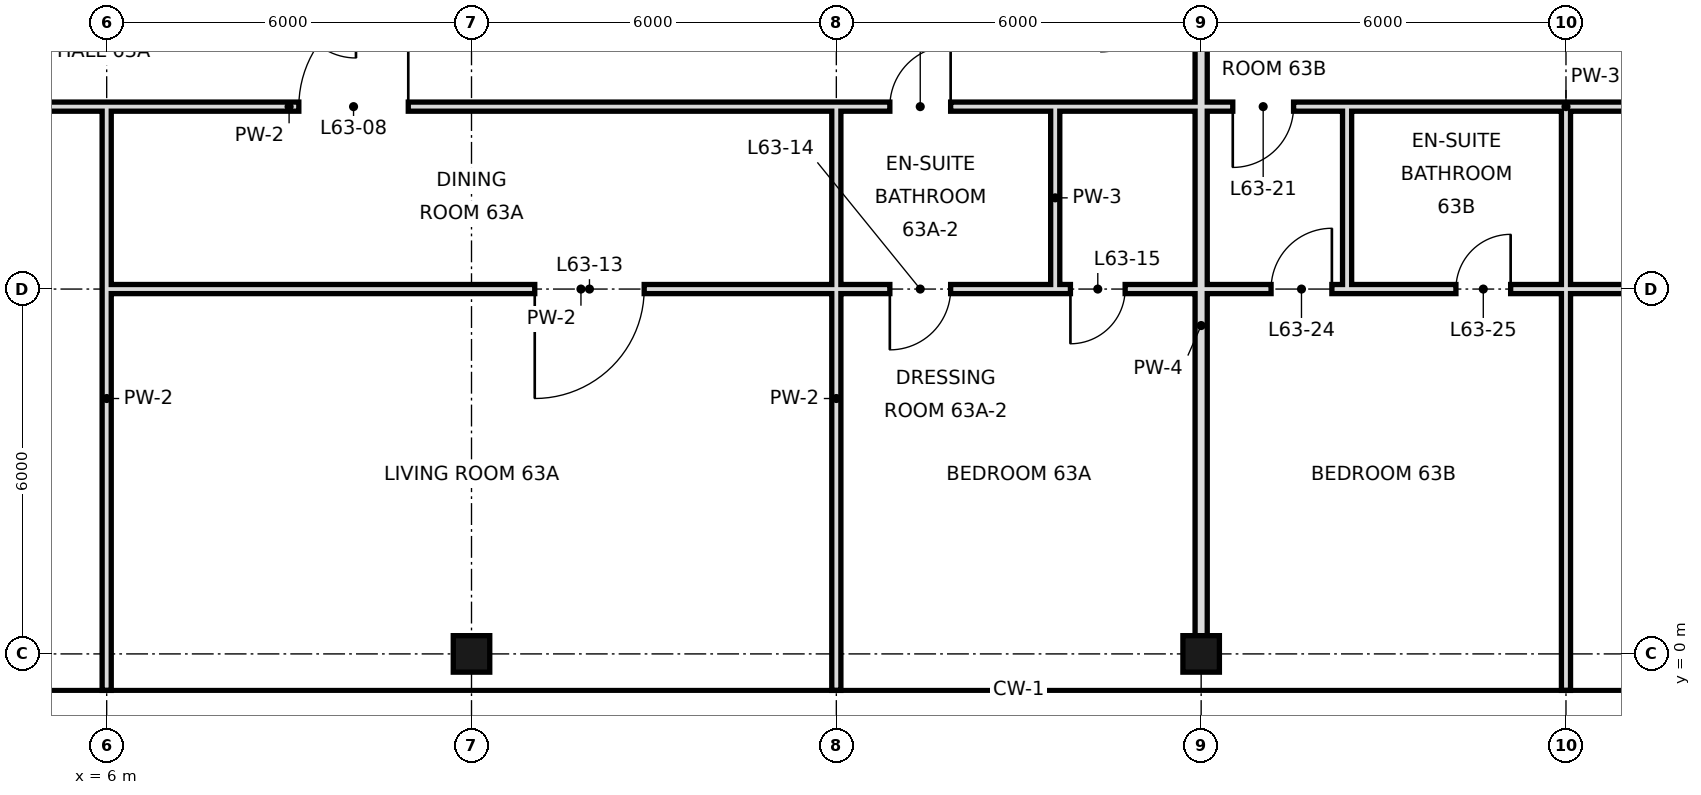
"""IFC4 building model, lengths in metres.
Left out: names, types, materials, properties, quantities, classifications, styles, units other than length and angle.
Written with IfcOpenShell. Run it as: python <this file> out.ifc"""

import sys

from ifc_helpers import new_model, si_unit, direction, frame, frame_2d, origin, origin_2d, place, context, subcontext, project, spatial, rectangle, hollow_rectangle, extrude, element, fill, save


model = new_model("IFC4")
c1 = context("Model", 3, precision=1e-05, world=origin(), true_north=direction((0.0, 1.0)))
c2 = subcontext(c1, "Body", "Model", "MODEL_VIEW")
j1 = project(units=[si_unit("LENGTHUNIT", "METRE"), si_unit("PLANEANGLEUNIT", "RADIAN")], contexts=[c1])
p1 = place(None, origin())
s1 = spatial("IfcSite", under=j1, at=p1, CompositionType="ELEMENT")
p2 = place(p1, origin())
s2 = spatial("IfcBuilding", under=s1, at=p2, CompositionType="ELEMENT")
p3 = place(p2, frame((0.0, 0.0, 266.6)))
s3 = spatial("IfcBuildingStorey", under=s2, at=p3, CompositionType="ELEMENT", Elevation=266.6)
for number, where, z_axis, x_axis in (
    (1, (12.0, 0.0, 0.0), (0.0, 0.0, 1.0), (1.0, 0.0, 0.0)),
    (2, (24.0, 0.0, 0.0), (0.0, 0.0, 1.0), (1.0, 0.0, 0.0)),
):
    element("IfcColumn", number, at=place(p3, frame(where, z_axis=z_axis, x_axis=x_axis)), inside=s3, PredefinedType="COLUMN", context=c2, shape_type="SweptSolid", body=[
        extrude(hollow_rectangle(XDim=0.6, YDim=0.6, WallThickness=0.028, at=origin_2d()), origin(), (0.0, 0.0, 1.0), 3.6),
    ])
p4 = place(p3, frame((18.0, -0.6, 0.0), z_axis=(0.0, 0.0, 1.0), x_axis=(0.0, 1.0, 0.0)))
e3 = element("IfcWall", 3, at=p4, inside=s3, PredefinedType="PARTITIONING", context=c2, shape_type="SweptSolid", body=[
    extrude(rectangle(XDim=9.6, YDim=0.15, at=frame_2d((4.8, 0.0))), origin(), (0.0, 0.0, 1.0), 2.72),
])
p5 = place(p3, frame((21.6, 6.0, 0.0), z_axis=(0.0, 0.0, 1.0), x_axis=(0.0, 1.0, 0.0)))
e4 = element("IfcWall", 4, at=p5, inside=s3, PredefinedType="PARTITIONING", context=c2, shape_type="SweptSolid", body=[
    extrude(rectangle(XDim=3.0, YDim=0.15, at=frame_2d((1.5, 0.0))), origin(), (0.0, 0.0, 1.0), 3.42),
])
p6 = place(p3, frame((24.0, 0.0, 0.0), z_axis=(0.0, 0.0, 1.0), x_axis=(0.0, 1.0, 0.0)))
e5 = element("IfcWall", 5, at=p6, inside=s3, PredefinedType="SOLIDWALL", context=c2, shape_type="SweptSolid", body=[
    extrude(rectangle(XDim=10.8, YDim=0.2, at=frame_2d((5.4, 0.0))), origin(), (0.0, 0.0, 1.0), 2.72),
])
p7 = place(p3, frame((26.4, 6.0, 0.0), z_axis=(0.0, 0.0, 1.0), x_axis=(0.0, 1.0, 0.0)))
e6 = element("IfcWall", 6, at=p7, inside=s3, PredefinedType="PARTITIONING", context=c2, shape_type="SweptSolid", body=[
    extrude(rectangle(XDim=3.0, YDim=0.15, at=frame_2d((1.5, 0.0))), origin(), (0.0, 0.0, 1.0), 3.42),
])
p8 = place(p3, frame((30.0, -0.6, 0.0), z_axis=(0.0, 0.0, 1.0), x_axis=(0.0, 1.0, 0.0)))
e7 = element("IfcWall", 7, at=p8, inside=s3, PredefinedType="PARTITIONING", context=c2, shape_type="SweptSolid", body=[
    extrude(rectangle(XDim=6.6, YDim=0.15, at=frame_2d((3.3, 0.0))), origin(), (0.0, 0.0, 1.0), 2.72),
])
p9 = place(p3, frame((30.0, 6.0, 0.0), z_axis=(0.0, 0.0, 1.0), x_axis=(0.0, 1.0, 0.0)))
e8 = element("IfcWall", 8, at=p9, inside=s3, PredefinedType="PARTITIONING", context=c2, shape_type="SweptSolid", body=[
    extrude(rectangle(XDim=3.0, YDim=0.15, at=frame_2d((1.5, 0.0))), origin(), (0.0, 0.0, 1.0), 2.72),
])
p10 = place(p3, frame((6.0, -0.6, 0.0), z_axis=(0.0, 0.0, 1.0), x_axis=(0.0, 1.0, 0.0)))
e9 = element("IfcWall", 9, at=p10, inside=s3, PredefinedType="PARTITIONING", context=c2, shape_type="SweptSolid", body=[
    extrude(rectangle(XDim=9.6, YDim=0.15, at=frame_2d((4.8, 0.0))), origin(), (0.0, 0.0, 1.0), 2.72),
])
p11 = place(p3, frame((6.0, 6.0, 0.0), z_axis=(0.0, 0.0, 1.0), x_axis=(1.0, 0.0, 0.0)))
e10 = element("IfcWall", 10, at=p11, inside=s3, PredefinedType="PARTITIONING", context=c2, shape_type="SweptSolid", body=[
    extrude(rectangle(XDim=15.6, YDim=0.15, at=frame_2d((7.8, 0.0))), origin(), (0.0, 0.0, 1.0), 2.97),
])
p12 = place(p11, frame((7.04, 0.0, 0.0)))
e11 = element("IfcOpeningElement", 11, at=p12, cuts=e10, PredefinedType="OPENING", context=c2, shape_type="SweptSolid", body=[
    extrude(rectangle(XDim=1.8, YDim=2.4, at=frame_2d((0.9, 1.2))), frame((0.0, 0.085, 0.0), z_axis=(0.0, -1.0, 0.0), x_axis=(1.0, 0.0, 0.0)), (0.0, 0.0, 1.0), 0.17),
])
p13 = place(p11, frame((12.88, 0.0, 0.0)))
e12 = element("IfcOpeningElement", 12, at=p13, cuts=e10, PredefinedType="OPENING", context=c2, shape_type="SweptSolid", body=[
    extrude(rectangle(XDim=1.0, YDim=2.4, at=frame_2d((0.5, 1.2))), frame((0.0, 0.085, 0.0), z_axis=(0.0, -1.0, 0.0), x_axis=(1.0, 0.0, 0.0)), (0.0, 0.0, 1.0), 0.17),
])
p14 = place(p3, frame((24.0, 6.0, 0.0), z_axis=(0.0, 0.0, 1.0), x_axis=(1.0, 0.0, 0.0)))
e13 = element("IfcWall", 13, at=p14, inside=s3, PredefinedType="PARTITIONING", context=c2, shape_type="SweptSolid", body=[
    extrude(rectangle(XDim=2.4, YDim=0.15, at=frame_2d((1.2, 0.0))), origin(), (0.0, 0.0, 1.0), 2.97),
])
p15 = place(p14, frame((1.15, 0.0, 0.0)))
e14 = element("IfcOpeningElement", 14, at=p15, cuts=e13, PredefinedType="OPENING", context=c2, shape_type="SweptSolid", body=[
    extrude(rectangle(XDim=1.0, YDim=2.4, at=frame_2d((0.5, 1.2))), frame((0.0, 0.085, 0.0), z_axis=(0.0, -1.0, 0.0), x_axis=(1.0, 0.0, 0.0)), (0.0, 0.0, 1.0), 0.17),
])
p16 = place(p3, frame((30.0, 6.0, 0.0), z_axis=(0.0, 0.0, 1.0), x_axis=(1.0, 0.0, 0.0)))
e15 = element("IfcWall", 15, at=p16, inside=s3, PredefinedType="PARTITIONING", context=c2, shape_type="SweptSolid", body=[
    extrude(rectangle(XDim=15.6, YDim=0.15, at=frame_2d((7.8, 0.0))), origin(), (0.0, 0.0, 1.0), 2.97),
])
p17 = place(p16, frame((3.16, 0.0, 0.0)))
e16 = element("IfcOpeningElement", 16, at=p17, cuts=e15, PredefinedType="OPENING", context=c2, shape_type="SweptSolid", body=[
    extrude(rectangle(XDim=1.8, YDim=2.4, at=frame_2d((0.9, 1.2))), frame((0.0, 0.085, 0.0), z_axis=(0.0, -1.0, 0.0), x_axis=(1.0, 0.0, 0.0)), (0.0, 0.0, 1.0), 0.17),
])
p18 = place(p16, frame((12.88, 0.0, 0.0)))
e17 = element("IfcOpeningElement", 17, at=p18, cuts=e15, PredefinedType="OPENING", context=c2, shape_type="SweptSolid", body=[
    extrude(rectangle(XDim=1.0, YDim=2.4, at=frame_2d((0.5, 1.2))), frame((0.0, 0.085, 0.0), z_axis=(0.0, -1.0, 0.0), x_axis=(1.0, 0.0, 0.0)), (0.0, 0.0, 1.0), 0.17),
])
p19 = place(p3, frame((21.6, 6.0, 0.0), z_axis=(0.0, 0.0, 1.0), x_axis=(1.0, 0.0, 0.0)))
e18 = element("IfcWall", 18, at=p19, inside=s3, PredefinedType="PARTITIONING", context=c2, shape_type="SweptSolid", body=[
    extrude(rectangle(XDim=2.4, YDim=0.15, at=frame_2d((1.2, 0.0))), origin(), (0.0, 0.0, 1.0), 2.97),
])
p20 = place(p19, frame((0.25, 0.0, 0.0)))
e19 = element("IfcOpeningElement", 19, at=p20, cuts=e18, PredefinedType="OPENING", context=c2, shape_type="SweptSolid", body=[
    extrude(rectangle(XDim=0.9, YDim=2.4, at=frame_2d((0.45, 1.2))), frame((0.0, 0.085, 0.0), z_axis=(0.0, -1.0, 0.0), x_axis=(1.0, 0.0, 0.0)), (0.0, 0.0, 1.0), 0.17),
])
p21 = place(p3, frame((26.4, 6.0, 0.0), z_axis=(0.0, 0.0, 1.0), x_axis=(1.0, 0.0, 0.0)))
e20 = element("IfcWall", 20, at=p21, inside=s3, PredefinedType="PARTITIONING", context=c2, shape_type="SweptSolid", body=[
    extrude(rectangle(XDim=3.6, YDim=0.15, at=frame_2d((1.8, 0.0))), origin(), (0.0, 0.0, 1.0), 2.97),
])
p22 = place(p21, frame((1.79, 0.0, 0.0)))
e21 = element("IfcOpeningElement", 21, at=p22, cuts=e20, PredefinedType="OPENING", context=c2, shape_type="SweptSolid", body=[
    extrude(rectangle(XDim=0.9, YDim=2.4, at=frame_2d((0.45, 1.2))), frame((0.0, 0.085, 0.0), z_axis=(0.0, -1.0, 0.0), x_axis=(1.0, 0.0, 0.0)), (0.0, 0.0, 1.0), 0.17),
])
p23 = place(p3, frame((-3.6, 9.0, 0.0), z_axis=(0.0, 0.0, 1.0), x_axis=(1.0, 0.0, 0.0)))
e22 = element("IfcWall", 22, at=p23, inside=s3, PredefinedType="PARTITIONING", context=c2, shape_type="SweptSolid", body=[
    extrude(rectangle(XDim=25.2, YDim=0.15, at=frame_2d((12.6, 0.0))), origin(), (0.0, 0.0, 1.0), 3.42),
])
p24 = place(p23, frame((1.72, 0.0, 0.0)))
e23 = element("IfcOpeningElement", 23, at=p24, cuts=e22, PredefinedType="OPENING", context=c2, shape_type="SweptSolid", body=[
    extrude(rectangle(XDim=1.0, YDim=2.4, at=frame_2d((0.5, 1.2))), frame((0.0, 0.085, 0.0), z_axis=(0.0, -1.0, 0.0), x_axis=(1.0, 0.0, 0.0)), (0.0, 0.0, 1.0), 0.17),
])
p25 = place(p23, frame((7.0, 0.0, 0.0)))
e24 = element("IfcOpeningElement", 24, at=p25, cuts=e22, PredefinedType="OPENING", context=c2, shape_type="SweptSolid", body=[
    extrude(rectangle(XDim=1.0, YDim=2.4, at=frame_2d((0.5, 1.2))), frame((0.0, 0.085, 0.0), z_axis=(0.0, -1.0, 0.0), x_axis=(1.0, 0.0, 0.0)), (0.0, 0.0, 1.0), 0.17),
])
p26 = place(p23, frame((12.76, 0.0, 0.0)))
e25 = element("IfcOpeningElement", 25, at=p26, cuts=e22, PredefinedType="OPENING", context=c2, shape_type="SweptSolid", body=[
    extrude(rectangle(XDim=1.8, YDim=2.4, at=frame_2d((0.9, 1.2))), frame((0.0, 0.085, 0.0), z_axis=(0.0, -1.0, 0.0), x_axis=(1.0, 0.0, 0.0)), (0.0, 0.0, 1.0), 0.17),
])
p27 = place(p23, frame((22.48, 0.0, 0.0)))
e26 = element("IfcOpeningElement", 26, at=p27, cuts=e22, PredefinedType="OPENING", context=c2, shape_type="SweptSolid", body=[
    extrude(rectangle(XDim=1.0, YDim=2.4, at=frame_2d((0.5, 1.2))), frame((0.0, 0.085, 0.0), z_axis=(0.0, -1.0, 0.0), x_axis=(1.0, 0.0, 0.0)), (0.0, 0.0, 1.0), 0.17),
])
p28 = place(p3, frame((24.0, 9.0, 0.0), z_axis=(0.0, 0.0, 1.0), x_axis=(1.0, 0.0, 0.0)))
e27 = element("IfcWall", 27, at=p28, inside=s3, PredefinedType="PARTITIONING", context=c2, shape_type="SweptSolid", body=[
    extrude(rectangle(XDim=2.4, YDim=0.15, at=frame_2d((1.2, 0.0))), origin(), (0.0, 0.0, 1.0), 3.42),
])
p29 = place(p28, frame((0.52, 0.0, 0.0)))
e28 = element("IfcOpeningElement", 28, at=p29, cuts=e27, PredefinedType="OPENING", context=c2, shape_type="SweptSolid", body=[
    extrude(rectangle(XDim=1.0, YDim=2.4, at=frame_2d((0.5, 1.2))), frame((0.0, 0.085, 0.0), z_axis=(0.0, -1.0, 0.0), x_axis=(1.0, 0.0, 0.0)), (0.0, 0.0, 1.0), 0.17),
])
p30 = place(p3, frame((30.0, 9.0, 0.0), z_axis=(0.0, 0.0, 1.0), x_axis=(1.0, 0.0, 0.0)))
e29 = element("IfcWall", 29, at=p30, inside=s3, PredefinedType="PARTITIONING", context=c2, shape_type="SweptSolid", body=[
    extrude(rectangle(XDim=15.6, YDim=0.15, at=frame_2d((7.8, 0.0))), origin(), (0.0, 0.0, 1.0), 3.42),
])
p31 = place(p30, frame((5.1, 0.0, 0.0)))
e30 = element("IfcOpeningElement", 30, at=p31, cuts=e29, PredefinedType="OPENING", context=c2, shape_type="SweptSolid", body=[
    extrude(rectangle(XDim=1.8, YDim=2.4, at=frame_2d((0.9, 1.2))), frame((0.0, 0.085, 0.0), z_axis=(0.0, -1.0, 0.0), x_axis=(1.0, 0.0, 0.0)), (0.0, 0.0, 1.0), 0.17),
])
p32 = place(p30, frame((13.72, 0.0, 0.0)))
e31 = element("IfcOpeningElement", 31, at=p32, cuts=e29, PredefinedType="OPENING", context=c2, shape_type="SweptSolid", body=[
    extrude(rectangle(XDim=1.0, YDim=2.4, at=frame_2d((0.5, 1.2))), frame((0.0, 0.085, 0.0), z_axis=(0.0, -1.0, 0.0), x_axis=(1.0, 0.0, 0.0)), (0.0, 0.0, 1.0), 0.17),
])
p33 = place(p3, frame((21.6, 9.0, 0.0), z_axis=(0.0, 0.0, 1.0), x_axis=(1.0, 0.0, 0.0)))
e32 = element("IfcWall", 32, at=p33, inside=s3, PredefinedType="PARTITIONING", context=c2, shape_type="SweptSolid", body=[
    extrude(rectangle(XDim=2.4, YDim=0.15, at=frame_2d((1.2, 0.0))), origin(), (0.0, 0.0, 1.0), 3.42),
])
p34 = place(p3, frame((26.4, 9.0, 0.0), z_axis=(0.0, 0.0, 1.0), x_axis=(1.0, 0.0, 0.0)))
e33 = element("IfcWall", 33, at=p34, inside=s3, PredefinedType="PARTITIONING", context=c2, shape_type="SweptSolid", body=[
    extrude(rectangle(XDim=3.6, YDim=0.15, at=frame_2d((1.8, 0.0))), origin(), (0.0, 0.0, 1.0), 3.42),
])
p35 = place(p26, frame((1.8, 0.0, 0.0), z_axis=(0.0, 0.0, 1.0), x_axis=(-1.0, 0.0, 0.0)))
e34 = element("IfcDoor", 34, at=p35, inside=s3, OperationType="SINGLE_SWING_LEFT", PredefinedType="DOOR", context=c2, shape_type="SweptSolid", body=[
    extrude(rectangle(XDim=1.8, YDim=2.4, at=frame_2d((0.9, 1.2))), frame((0.0, 0.025, 0.0), z_axis=(0.0, -1.0, 0.0), x_axis=(1.0, 0.0, 0.0)), (0.0, 0.0, 1.0), 0.05),
])
fill(e25, e34)
p36 = place(p27, frame((1.0, 0.0, 0.0), z_axis=(0.0, 0.0, 1.0), x_axis=(-1.0, 0.0, 0.0)))
e35 = element("IfcDoor", 35, at=p36, inside=s3, OperationType="SINGLE_SWING_LEFT", PredefinedType="DOOR", context=c2, shape_type="SweptSolid", body=[
    extrude(rectangle(XDim=1.0, YDim=2.4, at=frame_2d((0.5, 1.2))), frame((0.0, 0.025, 0.0), z_axis=(0.0, -1.0, 0.0), x_axis=(1.0, 0.0, 0.0)), (0.0, 0.0, 1.0), 0.05),
])
fill(e26, e35)
p37 = place(p12, frame((1.8, 0.0, 0.0), z_axis=(0.0, 0.0, 1.0), x_axis=(-1.0, 0.0, 0.0)))
e36 = element("IfcDoor", 36, at=p37, inside=s3, OperationType="SINGLE_SWING_RIGHT", PredefinedType="DOOR", context=c2, shape_type="SweptSolid", body=[
    extrude(rectangle(XDim=1.8, YDim=2.4, at=frame_2d((0.9, 1.2))), frame((0.0, 0.025, 0.0), z_axis=(0.0, -1.0, 0.0), x_axis=(1.0, 0.0, 0.0)), (0.0, 0.0, 1.0), 0.05),
])
fill(e11, e36)
p38 = place(p13, frame((1.0, 0.0, 0.0), z_axis=(0.0, 0.0, 1.0), x_axis=(-1.0, 0.0, 0.0)))
e37 = element("IfcDoor", 37, at=p38, inside=s3, OperationType="SINGLE_SWING_RIGHT", PredefinedType="DOOR", context=c2, shape_type="SweptSolid", body=[
    extrude(rectangle(XDim=1.0, YDim=2.4, at=frame_2d((0.5, 1.2))), frame((0.0, 0.025, 0.0), z_axis=(0.0, -1.0, 0.0), x_axis=(1.0, 0.0, 0.0)), (0.0, 0.0, 1.0), 0.05),
])
fill(e12, e37)
p39 = place(p20, frame((0.9, 0.0, 0.0), z_axis=(0.0, 0.0, 1.0), x_axis=(-1.0, 0.0, 0.0)))
e38 = element("IfcDoor", 38, at=p39, inside=s3, OperationType="SINGLE_SWING_RIGHT", PredefinedType="DOOR", context=c2, shape_type="SweptSolid", body=[
    extrude(rectangle(XDim=0.9, YDim=2.4, at=frame_2d((0.45, 1.2))), frame((0.0, 0.025, 0.0), z_axis=(0.0, -1.0, 0.0), x_axis=(1.0, 0.0, 0.0)), (0.0, 0.0, 1.0), 0.05),
])
fill(e19, e38)
p40 = place(p29, frame((1.0, 0.0, 0.0), z_axis=(0.0, 0.0, 1.0), x_axis=(-1.0, 0.0, 0.0)))
e39 = element("IfcDoor", 39, at=p40, inside=s3, OperationType="SINGLE_SWING_RIGHT", PredefinedType="DOOR", context=c2, shape_type="SweptSolid", body=[
    extrude(rectangle(XDim=1.0, YDim=2.4, at=frame_2d((0.5, 1.2))), frame((0.0, 0.025, 0.0), z_axis=(0.0, -1.0, 0.0), x_axis=(1.0, 0.0, 0.0)), (0.0, 0.0, 1.0), 0.05),
])
fill(e28, e39)
p41 = place(p15, frame((1.0, 0.0, 0.0), z_axis=(0.0, 0.0, 1.0), x_axis=(-1.0, 0.0, 0.0)))
e40 = element("IfcDoor", 40, at=p41, inside=s3, OperationType="SINGLE_SWING_LEFT", PredefinedType="DOOR", context=c2, shape_type="SweptSolid", body=[
    extrude(rectangle(XDim=1.0, YDim=2.4, at=frame_2d((0.5, 1.2))), frame((0.0, 0.025, 0.0), z_axis=(0.0, -1.0, 0.0), x_axis=(1.0, 0.0, 0.0)), (0.0, 0.0, 1.0), 0.05),
])
fill(e14, e40)
p42 = place(p22, frame((0.9, 0.0, 0.0), z_axis=(0.0, 0.0, 1.0), x_axis=(-1.0, 0.0, 0.0)))
e41 = element("IfcDoor", 41, at=p42, inside=s3, OperationType="SINGLE_SWING_LEFT", PredefinedType="DOOR", context=c2, shape_type="SweptSolid", body=[
    extrude(rectangle(XDim=0.9, YDim=2.4, at=frame_2d((0.45, 1.2))), frame((0.0, 0.025, 0.0), z_axis=(0.0, -1.0, 0.0), x_axis=(1.0, 0.0, 0.0)), (0.0, 0.0, 1.0), 0.05),
])
fill(e21, e41)
save(model, sys.argv[1])
